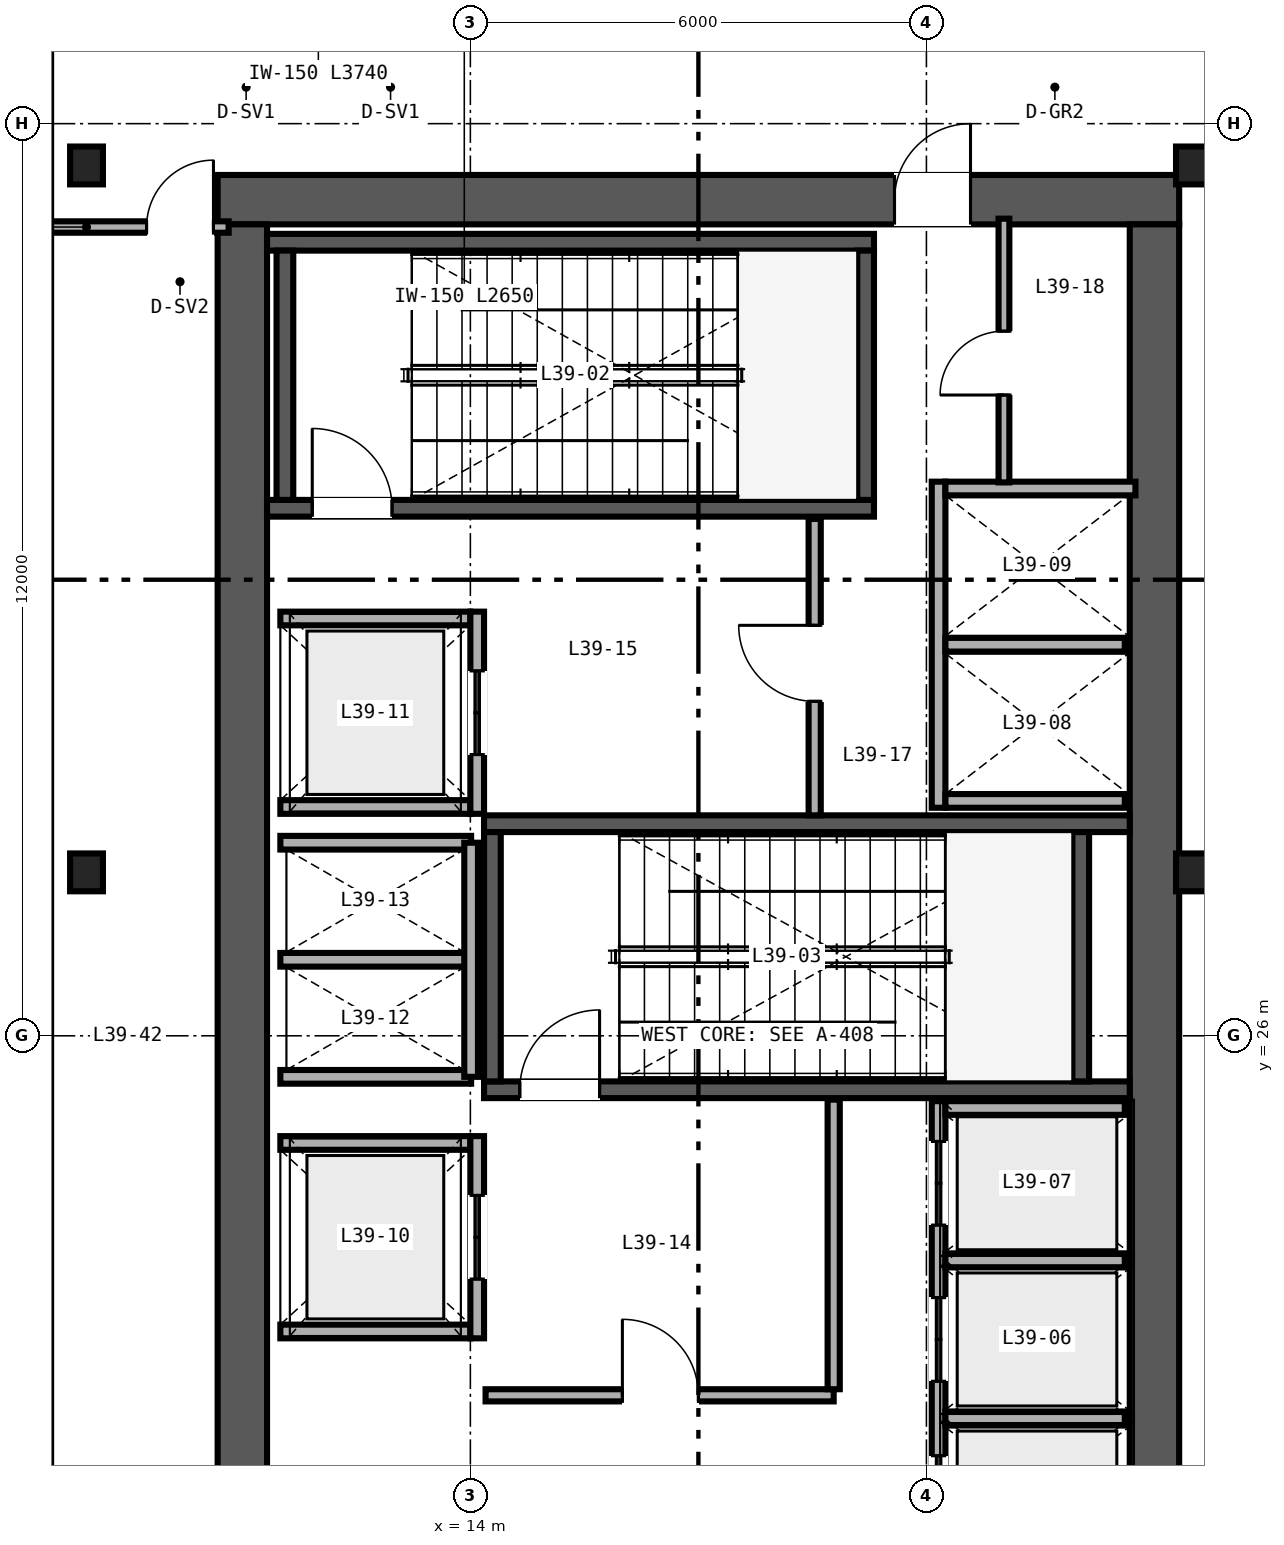
"""IFC4 building model, lengths in metres.
Left out: names, types, materials, properties, quantities, classifications, styles, units other than length and angle.
Written with IfcOpenShell. Run it as: python <this file> out.ifc"""

import sys

from ifc_helpers import new_model, si_unit, direction, frame, frame_2d, origin, origin_2d, place, context, subcontext, project, spatial, rectangle, i_section, extrude, source, transform, mapped, element, fill, save


model = new_model("IFC4")
c1 = context("Model", 3, precision=1e-05, world=origin(), true_north=direction((0.0, 1.0)))
c2 = subcontext(c1, "Body", "Model", "MODEL_VIEW")
j1 = project(units=[si_unit("LENGTHUNIT", "METRE"), si_unit("PLANEANGLEUNIT", "RADIAN")], contexts=[c1])
p1 = place(None, origin())
s1 = spatial("IfcSite", under=j1, at=p1, CompositionType="ELEMENT")
p2 = place(p1, origin())
s2 = spatial("IfcBuilding", under=s1, at=p2, CompositionType="ELEMENT")
p3 = place(p2, frame((0.0, 0.0, 158.4)))
s3 = spatial("IfcBuildingStorey", under=s2, at=p3, CompositionType="ELEMENT", Elevation=158.4)
p4 = place(p3, frame((10.675, 37.0, 0.0), z_axis=(0.0, 0.0, 1.0), x_axis=(1.0, 0.0, 0.0)))
e1 = element("IfcWall", 1, at=p4, inside=s3, PredefinedType="SHEAR", context=c2, shape_type="SweptSolid", body=[
    extrude(rectangle(XDim=12.65, YDim=0.65, at=frame_2d((6.325, 0.0))), origin(), (0.0, 0.0, 1.0), 4.57),
])
p5 = place(p4, frame((8.905, 0.0, 0.0)))
e2 = element("IfcOpeningElement", 2, at=p5, cuts=e1, PredefinedType="OPENING", context=c2, shape_type="SweptSolid", body=[
    extrude(rectangle(XDim=1.0, YDim=2.15, at=frame_2d((0.5, 1.075))), frame((0.0, 0.335, 0.0), z_axis=(0.0, -1.0, 0.0), x_axis=(1.0, 0.0, 0.0)), (0.0, 0.0, 1.0), 0.67),
])
for number, where, z_axis, x_axis in (
    (3, (11.0, 15.325, 0.0), (0.0, 0.0, 1.0), (0.0, 1.0, 0.0)),
    (4, (23.0, 15.325, 0.0), (0.0, 0.0, 1.0), (0.0, 1.0, 0.0)),
):
    element("IfcWall", number, at=place(p3, frame(where, z_axis=z_axis, x_axis=x_axis)), inside=s3, PredefinedType="SHEAR", context=c2, shape_type="SweptSolid", body=[
        extrude(rectangle(XDim=21.35, YDim=0.65, at=frame_2d((10.675, 0.0))), origin(), (0.0, 0.0, 1.0), 4.57),
    ])
p6 = place(p3, frame((11.325, 32.94, 0.0), z_axis=(0.0, 0.0, 1.0), x_axis=(1.0, 0.0, 0.0)))
e5 = element("IfcWall", 5, at=p6, inside=s3, PredefinedType="SHEAR", context=c2, shape_type="SweptSolid", body=[
    extrude(rectangle(XDim=7.985, YDim=0.22, at=frame_2d((3.993, 0.0))), origin(), (0.0, 0.0, 1.0), 4.6),
])
p7 = place(p6, frame((0.595, 0.0, 0.0)))
e6 = element("IfcOpeningElement", 6, at=p7, cuts=e5, PredefinedType="OPENING", context=c2, shape_type="SweptSolid", body=[
    extrude(rectangle(XDim=1.05, YDim=2.15, at=frame_2d((0.525, 1.075))), frame((0.0, 0.12, 0.0), z_axis=(0.0, -1.0, 0.0), x_axis=(1.0, 0.0, 0.0)), (0.0, 0.0, 1.0), 0.24),
])
p8 = place(p3, frame((11.325, 36.44, 0.0), z_axis=(0.0, 0.0, 1.0), x_axis=(1.0, 0.0, 0.0)))
e7 = element("IfcWall", 7, at=p8, inside=s3, PredefinedType="SHEAR", context=c2, shape_type="SweptSolid", body=[
    extrude(rectangle(XDim=7.985, YDim=0.22, at=frame_2d((3.993, 0.0))), origin(), (0.0, 0.0, 1.0), 4.6),
])
for number, where, z_axis, x_axis in (
    (8, (11.56, 33.05, 0.0), (0.0, 0.0, 1.0), (0.0, 1.0, 0.0)),
    (9, (19.2, 33.05, 0.0), (0.0, 0.0, 1.0), (0.0, 1.0, 0.0)),
):
    element("IfcWall", number, at=place(p3, frame(where, z_axis=z_axis, x_axis=x_axis)), inside=s3, PredefinedType="SHEAR", context=c2, shape_type="SweptSolid", body=[
        extrude(rectangle(XDim=3.28, YDim=0.22, at=frame_2d((1.64, 0.0))), origin(), (0.0, 0.0, 1.0), 4.6),
    ])
p9 = place(p3, frame((14.18, 25.29, 0.0), z_axis=(0.0, 0.0, 1.0), x_axis=(1.0, 0.0, 0.0)))
e10 = element("IfcWall", 10, at=p9, inside=s3, PredefinedType="SHEAR", context=c2, shape_type="SweptSolid", body=[
    extrude(rectangle(XDim=8.495, YDim=0.22, at=frame_2d((4.248, 0.0))), origin(), (0.0, 0.0, 1.0), 4.6),
])
p10 = place(p9, frame((0.47, 0.0, 0.0)))
e11 = element("IfcOpeningElement", 11, at=p10, cuts=e10, PredefinedType="OPENING", context=c2, shape_type="SweptSolid", body=[
    extrude(rectangle(XDim=1.05, YDim=2.15, at=frame_2d((0.525, 1.075))), frame((0.0, 0.12, 0.0), z_axis=(0.0, -1.0, 0.0), x_axis=(1.0, 0.0, 0.0)), (0.0, 0.0, 1.0), 0.24),
])
p11 = place(p3, frame((14.18, 28.79, 0.0), z_axis=(0.0, 0.0, 1.0), x_axis=(1.0, 0.0, 0.0)))
e12 = element("IfcWall", 12, at=p11, inside=s3, PredefinedType="SHEAR", context=c2, shape_type="SweptSolid", body=[
    extrude(rectangle(XDim=8.495, YDim=0.22, at=frame_2d((4.248, 0.0))), origin(), (0.0, 0.0, 1.0), 4.6),
])
for number, where, z_axis, x_axis in (
    (13, (14.29, 25.4, 0.0), (0.0, 0.0, 1.0), (0.0, 1.0, 0.0)),
    (14, (22.03, 25.4, 0.0), (0.0, 0.0, 1.0), (0.0, 1.0, 0.0)),
):
    element("IfcWall", number, at=place(p3, frame(where, z_axis=z_axis, x_axis=x_axis)), inside=s3, PredefinedType="SHEAR", context=c2, shape_type="SweptSolid", body=[
        extrude(rectangle(XDim=3.28, YDim=0.22, at=frame_2d((1.64, 0.0))), origin(), (0.0, 0.0, 1.0), 4.6),
    ])
m1 = source(origin(), c2, "Body", "SweptSolid", [
    extrude(i_section(OverallWidth=0.432, OverallDepth=0.498, WebThickness=0.056, FlangeThickness=0.089, FilletRadius=0.025, at=origin_2d()), origin(), (0.0, 0.0, 1.0), 4.57),
])
for number, where, z_axis, x_axis in (
    (15, (8.95, 28.15, 0.0), (0.0, 0.0, 1.0), (1.0, 0.0, 0.0)),
    (16, (23.5, 28.15, 0.0), (0.0, 0.0, 1.0), (1.0, 0.0, 0.0)),
    (17, (8.95, 37.45, 0.0), (0.0, 0.0, 1.0), (1.0, 0.0, 0.0)),
    (18, (23.5, 37.45, 0.0), (0.0, 0.0, 1.0), (1.0, 0.0, 0.0)),
):
    element("IfcColumn", number, at=place(p3, frame(where, z_axis=z_axis, x_axis=x_axis)), inside=s3, PredefinedType="COLUMN", context=c2, shape_type="MappedRepresentation", body=[
        mapped(m1, transform((0.0, 0.0, 0.0), scale=1.0)),
    ])
p12 = place(p3, frame((20.16, 18.82, 0.0), z_axis=(0.0, 0.0, 1.0), x_axis=(0.0, 1.0, 0.0)))
e19 = element("IfcWall", 19, at=p12, inside=s3, PredefinedType="SOLIDWALL", context=c2, shape_type="SweptSolid", body=[
    extrude(rectangle(XDim=6.32, YDim=0.18, at=frame_2d((3.16, 0.0))), origin(), (0.0, 0.0, 1.0), 3.47),
])
p13 = place(p12, frame((0.555, 0.0, 0.0)))
e20 = element("IfcOpeningElement", 20, at=p13, cuts=e19, PredefinedType="OPENING", context=c2, shape_type="SweptSolid", body=[
    extrude(rectangle(XDim=1.1, YDim=2.2, at=frame_2d((0.55, 1.1))), frame((0.0, 0.1, 0.0), z_axis=(0.0, -1.0, 0.0), x_axis=(1.0, 0.0, 0.0)), (0.0, 0.0, 1.0), 0.2),
])
p14 = place(p12, frame((2.635, 0.0, 0.0)))
e21 = element("IfcOpeningElement", 21, at=p14, cuts=e19, PredefinedType="OPENING", context=c2, shape_type="SweptSolid", body=[
    extrude(rectangle(XDim=1.1, YDim=2.2, at=frame_2d((0.55, 1.1))), frame((0.0, 0.1, 0.0), z_axis=(0.0, -1.0, 0.0), x_axis=(1.0, 0.0, 0.0)), (0.0, 0.0, 1.0), 0.2),
])
p15 = place(p12, frame((4.69, 0.0, 0.0)))
e22 = element("IfcOpeningElement", 22, at=p15, cuts=e19, PredefinedType="OPENING", context=c2, shape_type="SweptSolid", body=[
    extrude(rectangle(XDim=1.1, YDim=2.2, at=frame_2d((0.55, 1.1))), frame((0.0, 0.1, 0.0), z_axis=(0.0, -1.0, 0.0), x_axis=(1.0, 0.0, 0.0)), (0.0, 0.0, 1.0), 0.2),
])
p16 = place(p3, frame((20.25, 25.05, 0.0), z_axis=(0.0, 0.0, 1.0), x_axis=(1.0, 0.0, 0.0)))
e23 = element("IfcWall", 23, at=p16, inside=s3, PredefinedType="SOLIDWALL", context=c2, shape_type="SweptSolid", body=[
    extrude(rectangle(XDim=2.36, YDim=0.18, at=frame_2d((1.18, 0.0))), origin(), (0.0, 0.0, 1.0), 4.57),
])
p17 = place(p3, frame((20.25, 20.965, 0.0), z_axis=(0.0, 0.0, 1.0), x_axis=(1.0, 0.0, 0.0)))
e24 = element("IfcWall", 24, at=p17, inside=s3, PredefinedType="SOLIDWALL", context=c2, shape_type="SweptSolid", body=[
    extrude(rectangle(XDim=2.36, YDim=0.18, at=frame_2d((1.18, 0.0))), origin(), (0.0, 0.0, 1.0), 3.47),
])
p18 = place(p3, frame((20.25, 23.045, 0.0), z_axis=(0.0, 0.0, 1.0), x_axis=(1.0, 0.0, 0.0)))
e25 = element("IfcWall", 25, at=p18, inside=s3, PredefinedType="SOLIDWALL", context=c2, shape_type="SweptSolid", body=[
    extrude(rectangle(XDim=2.36, YDim=0.18, at=frame_2d((1.18, 0.0))), origin(), (0.0, 0.0, 1.0), 4.57),
])
p19 = place(p3, frame((20.16, 29.0, 0.0), z_axis=(0.0, 0.0, 1.0), x_axis=(0.0, 1.0, 0.0)))
e26 = element("IfcWall", 26, at=p19, inside=s3, PredefinedType="SOLIDWALL", context=c2, shape_type="SweptSolid", body=[
    extrude(rectangle(XDim=4.29, YDim=0.18, at=frame_2d((2.145, 0.0))), origin(), (0.0, 0.0, 1.0), 4.57),
])
p20 = place(p3, frame((20.25, 29.09, 0.0), z_axis=(0.0, 0.0, 1.0), x_axis=(1.0, 0.0, 0.0)))
e27 = element("IfcWall", 27, at=p20, inside=s3, PredefinedType="SOLIDWALL", context=c2, shape_type="SweptSolid", body=[
    extrude(rectangle(XDim=2.36, YDim=0.18, at=frame_2d((1.18, 0.0))), origin(), (0.0, 0.0, 1.0), 4.57),
])
p21 = place(p3, frame((20.25, 33.2, 0.0), z_axis=(0.0, 0.0, 1.0), x_axis=(1.0, 0.0, 0.0)))
e28 = element("IfcWall", 28, at=p21, inside=s3, PredefinedType="SOLIDWALL", context=c2, shape_type="SweptSolid", body=[
    extrude(rectangle(XDim=2.5, YDim=0.18, at=frame_2d((1.25, 0.0))), origin(), (0.0, 0.0, 1.0), 4.57),
])
p22 = place(p3, frame((20.25, 31.145, 0.0), z_axis=(0.0, 0.0, 1.0), x_axis=(1.0, 0.0, 0.0)))
e29 = element("IfcWall", 29, at=p22, inside=s3, PredefinedType="SOLIDWALL", context=c2, shape_type="SweptSolid", body=[
    extrude(rectangle(XDim=2.36, YDim=0.18, at=frame_2d((1.18, 0.0))), origin(), (0.0, 0.0, 1.0), 4.57),
])
for number, where, z_axis, x_axis in (
    (30, (11.5, 22.11, 0.0), (0.0, 0.0, 1.0), (1.0, 0.0, 0.0)),
    (31, (11.5, 24.59, 0.0), (0.0, 0.0, 1.0), (1.0, 0.0, 0.0)),
):
    element("IfcWall", number, at=place(p3, frame(where, z_axis=z_axis, x_axis=x_axis)), inside=s3, PredefinedType="SOLIDWALL", context=c2, shape_type="SweptSolid", body=[
        extrude(rectangle(XDim=2.5, YDim=0.18, at=frame_2d((1.25, 0.0))), origin(), (0.0, 0.0, 1.0), 4.57),
    ])
p23 = place(p3, frame((14.09, 22.02, 0.0), z_axis=(0.0, 0.0, 1.0), x_axis=(0.0, 1.0, 0.0)))
e32 = element("IfcWall", 32, at=p23, inside=s3, PredefinedType="SOLIDWALL", context=c2, shape_type="SweptSolid", body=[
    extrude(rectangle(XDim=2.66, YDim=0.18, at=frame_2d((1.33, 0.0))), origin(), (0.0, 0.0, 1.0), 4.57),
])
p24 = place(p23, frame((0.78, 0.0, 0.0)))
e33 = element("IfcOpeningElement", 33, at=p24, cuts=e32, PredefinedType="OPENING", context=c2, shape_type="SweptSolid", body=[
    extrude(rectangle(XDim=1.1, YDim=2.2, at=frame_2d((0.55, 1.1))), frame((0.0, 0.1, 0.0), z_axis=(0.0, -1.0, 0.0), x_axis=(1.0, 0.0, 0.0)), (0.0, 0.0, 1.0), 0.2),
])
for number, where, z_axis, x_axis in (
    (34, (11.5, 29.01, 0.0), (0.0, 0.0, 1.0), (1.0, 0.0, 0.0)),
    (35, (11.5, 31.49, 0.0), (0.0, 0.0, 1.0), (1.0, 0.0, 0.0)),
):
    element("IfcWall", number, at=place(p3, frame(where, z_axis=z_axis, x_axis=x_axis)), inside=s3, PredefinedType="SOLIDWALL", context=c2, shape_type="SweptSolid", body=[
        extrude(rectangle(XDim=2.5, YDim=0.18, at=frame_2d((1.25, 0.0))), origin(), (0.0, 0.0, 1.0), 4.57),
    ])
p25 = place(p3, frame((14.09, 28.92, 0.0), z_axis=(0.0, 0.0, 1.0), x_axis=(0.0, 1.0, 0.0)))
e36 = element("IfcWall", 36, at=p25, inside=s3, PredefinedType="SOLIDWALL", context=c2, shape_type="SweptSolid", body=[
    extrude(rectangle(XDim=2.66, YDim=0.18, at=frame_2d((1.33, 0.0))), origin(), (0.0, 0.0, 1.0), 4.57),
])
p26 = place(p25, frame((0.78, 0.0, 0.0)))
e37 = element("IfcOpeningElement", 37, at=p26, cuts=e36, PredefinedType="OPENING", context=c2, shape_type="SweptSolid", body=[
    extrude(rectangle(XDim=1.1, YDim=2.2, at=frame_2d((0.55, 1.1))), frame((0.0, 0.1, 0.0), z_axis=(0.0, -1.0, 0.0), x_axis=(1.0, 0.0, 0.0)), (0.0, 0.0, 1.0), 0.2),
])
for number, where, z_axis, x_axis in (
    (38, (11.5, 25.46, 0.0), (0.0, 0.0, 1.0), (1.0, 0.0, 0.0)),
    (39, (11.5, 27.0, 0.0), (0.0, 0.0, 1.0), (1.0, 0.0, 0.0)),
    (40, (11.5, 28.54, 0.0), (0.0, 0.0, 1.0), (1.0, 0.0, 0.0)),
):
    element("IfcWall", number, at=place(p3, frame(where, z_axis=z_axis, x_axis=x_axis)), inside=s3, PredefinedType="SOLIDWALL", context=c2, shape_type="SweptSolid", body=[
        extrude(rectangle(XDim=2.51, YDim=0.18, at=frame_2d((1.255, 0.0))), origin(), (0.0, 0.0, 1.0), 4.57),
    ])
p27 = place(p3, frame((14.01, 25.46, 0.0), z_axis=(0.0, 0.0, 1.0), x_axis=(0.0, 1.0, 0.0)))
e41 = element("IfcWall", 41, at=p27, inside=s3, PredefinedType="SOLIDWALL", context=c2, shape_type="SweptSolid", body=[
    extrude(rectangle(XDim=3.08, YDim=0.18, at=frame_2d((1.54, 0.0))), origin(), (0.0, 0.0, 1.0), 4.57),
])
p28 = place(p3, frame((14.2, 21.27, 0.0), z_axis=(0.0, 0.0, 1.0), x_axis=(1.0, 0.0, 0.0)))
e42 = element("IfcWall", 42, at=p28, inside=s3, PredefinedType="PARTITIONING", context=c2, shape_type="SweptSolid", body=[
    extrude(rectangle(XDim=4.58, YDim=0.16, at=frame_2d((2.29, 0.0))), origin(), (0.0, 0.0, 1.0), 4.57),
])
p29 = place(p28, frame((1.8, 0.0, 0.0)))
e43 = element("IfcOpeningElement", 43, at=p29, cuts=e42, PredefinedType="OPENING", context=c2, shape_type="SweptSolid", body=[
    extrude(rectangle(XDim=1.0, YDim=2.15, at=frame_2d((0.5, 1.075))), frame((0.0, 0.09, 0.0), z_axis=(0.0, -1.0, 0.0), x_axis=(1.0, 0.0, 0.0)), (0.0, 0.0, 1.0), 0.18),
])
p30 = place(p3, frame((18.78, 21.35, 0.0), z_axis=(0.0, 0.0, 1.0), x_axis=(0.0, 1.0, 0.0)))
e44 = element("IfcWall", 44, at=p30, inside=s3, PredefinedType="PARTITIONING", context=c2, shape_type="SweptSolid", body=[
    extrude(rectangle(XDim=3.81, YDim=0.16, at=frame_2d((1.905, 0.0))), origin(), (0.0, 0.0, 1.0), 4.57),
])
p31 = place(p3, frame((18.53, 28.9, 0.0), z_axis=(0.0, 0.0, 1.0), x_axis=(0.0, 1.0, 0.0)))
e45 = element("IfcWall", 45, at=p31, inside=s3, PredefinedType="PARTITIONING", context=c2, shape_type="SweptSolid", body=[
    extrude(rectangle(XDim=3.9, YDim=0.16, at=frame_2d((1.95, 0.0))), origin(), (0.0, 0.0, 1.0), 4.57),
])
p32 = place(p31, frame((1.5, 0.0, 0.0)))
e46 = element("IfcOpeningElement", 46, at=p32, cuts=e45, PredefinedType="OPENING", context=c2, shape_type="SweptSolid", body=[
    extrude(rectangle(XDim=1.0, YDim=2.15, at=frame_2d((0.5, 1.075))), frame((0.0, 0.09, 0.0), z_axis=(0.0, -1.0, 0.0), x_axis=(1.0, 0.0, 0.0)), (0.0, 0.0, 1.0), 0.18),
])
p33 = place(p3, frame((21.02, 33.28, 0.0), z_axis=(0.0, 0.0, 1.0), x_axis=(0.0, 1.0, 0.0)))
e47 = element("IfcWall", 47, at=p33, inside=s3, PredefinedType="PARTITIONING", context=c2, shape_type="SweptSolid", body=[
    extrude(rectangle(XDim=3.47, YDim=0.142, at=frame_2d((1.735, 0.0))), origin(), (0.0, 0.0, 1.0), 4.57),
])
p34 = place(p33, frame((1.15, 0.0, 0.0)))
e48 = element("IfcOpeningElement", 48, at=p34, cuts=e47, PredefinedType="OPENING", context=c2, shape_type="SweptSolid", body=[
    extrude(rectangle(XDim=0.84, YDim=2.1, at=frame_2d((0.42, 1.05))), frame((0.0, 0.081, 0.0), z_axis=(0.0, -1.0, 0.0), x_axis=(1.0, 0.0, 0.0)), (0.0, 0.0, 1.0), 0.162),
])
p35 = place(p3, frame((8.16, 36.64, 0.0), z_axis=(0.0, 0.0, 1.0), x_axis=(1.0, 0.0, 0.0)))
e49 = element("IfcWall", 49, at=p35, inside=s3, PredefinedType="PARTITIONING", context=c2, shape_type="SweptSolid", body=[
    extrude(rectangle(XDim=2.66, YDim=0.15, at=frame_2d((1.33, 0.0))), origin(), (0.0, 0.0, 1.0), 3.953),
])
p36 = place(p35, frame((1.58, 0.0, 0.0)))
e50 = element("IfcOpeningElement", 50, at=p36, cuts=e49, PredefinedType="OPENING", context=c2, shape_type="SweptSolid", body=[
    extrude(rectangle(XDim=0.88, YDim=2.15, at=frame_2d((0.44, 1.075))), frame((0.0, 0.085, 0.0), z_axis=(0.0, -1.0, 0.0), x_axis=(1.0, 0.0, 0.0)), (0.0, 0.0, 1.0), 0.17),
])
m2 = source(origin(), c2, "Body", "SweptSolid", [
    extrude(rectangle(XDim=1.05, YDim=2.15, at=frame_2d((0.525, 1.075))), frame((0.0, 0.025, 0.0), z_axis=(0.0, -1.0, 0.0), x_axis=(1.0, 0.0, 0.0)), (0.0, 0.0, 1.0), 0.05),
])
p37 = place(p7, origin())
e51 = element("IfcDoor", 51, at=p37, inside=s3, OperationType="SINGLE_SWING_LEFT", PredefinedType="DOOR", context=c2, shape_type="MappedRepresentation", body=[
    mapped(m2, transform((0.0, 0.0, 0.0), scale=1.0)),
])
fill(e6, e51)
p38 = place(p10, origin())
e52 = element("IfcDoor", 52, at=p38, inside=s3, OperationType="SINGLE_SWING_RIGHT", PredefinedType="DOOR", context=c2, shape_type="MappedRepresentation", body=[
    mapped(m2, transform((0.0, 0.0, 0.0), scale=1.0)),
])
fill(e11, e52)
m3 = source(origin(), c2, "Body", "SweptSolid", [
    extrude(rectangle(XDim=1.1, YDim=2.2, at=frame_2d((0.55, 1.1))), frame((0.0, 0.025, 0.0), z_axis=(0.0, -1.0, 0.0), x_axis=(1.0, 0.0, 0.0)), (0.0, 0.0, 1.0), 0.05),
])
p39 = place(p13, origin())
e53 = element("IfcDoor", 53, at=p39, inside=s3, OperationType="DOUBLE_DOOR_SLIDING", PredefinedType="DOOR", context=c2, shape_type="MappedRepresentation", body=[
    mapped(m3, transform((0.0, 0.0, 0.0), scale=1.0)),
])
fill(e20, e53)
p40 = place(p14, origin())
e54 = element("IfcDoor", 54, at=p40, inside=s3, OperationType="DOUBLE_DOOR_SLIDING", PredefinedType="DOOR", context=c2, shape_type="MappedRepresentation", body=[
    mapped(m3, transform((0.0, 0.0, 0.0), scale=1.0)),
])
fill(e21, e54)
p41 = place(p15, origin())
e55 = element("IfcDoor", 55, at=p41, inside=s3, OperationType="DOUBLE_DOOR_SLIDING", PredefinedType="DOOR", context=c2, shape_type="MappedRepresentation", body=[
    mapped(m3, transform((0.0, 0.0, 0.0), scale=1.0)),
])
fill(e22, e55)
p42 = place(p24, origin())
e56 = element("IfcDoor", 56, at=p42, inside=s3, OperationType="DOUBLE_DOOR_SLIDING", PredefinedType="DOOR", context=c2, shape_type="MappedRepresentation", body=[
    mapped(m3, transform((0.0, 0.0, 0.0), scale=1.0)),
])
fill(e33, e56)
p43 = place(p26, origin())
e57 = element("IfcDoor", 57, at=p43, inside=s3, OperationType="DOUBLE_DOOR_SLIDING", PredefinedType="DOOR", context=c2, shape_type="MappedRepresentation", body=[
    mapped(m3, transform((0.0, 0.0, 0.0), scale=1.0)),
])
fill(e37, e57)
m4 = source(origin(), c2, "Body", "SweptSolid", [
    extrude(rectangle(XDim=1.0, YDim=2.15, at=frame_2d((0.5, 1.075))), frame((0.0, 0.025, 0.0), z_axis=(0.0, -1.0, 0.0), x_axis=(1.0, 0.0, 0.0)), (0.0, 0.0, 1.0), 0.05),
])
p44 = place(p29, origin())
e58 = element("IfcDoor", 58, at=p44, inside=s3, OperationType="SINGLE_SWING_LEFT", PredefinedType="DOOR", context=c2, shape_type="MappedRepresentation", body=[
    mapped(m4, transform((0.0, 0.0, 0.0), scale=1.0)),
])
fill(e43, e58)
p45 = place(p32, origin())
e59 = element("IfcDoor", 59, at=p45, inside=s3, OperationType="SINGLE_SWING_RIGHT", PredefinedType="DOOR", context=c2, shape_type="MappedRepresentation", body=[
    mapped(m4, transform((0.0, 0.0, 0.0), scale=1.0)),
])
fill(e46, e59)
m5 = source(origin(), c2, "Body", "SweptSolid", [
    extrude(rectangle(XDim=0.84, YDim=2.1, at=frame_2d((0.42, 1.05))), frame((0.0, 0.025, 0.0), z_axis=(0.0, -1.0, 0.0), x_axis=(1.0, 0.0, 0.0)), (0.0, 0.0, 1.0), 0.05),
])
p46 = place(p34, origin())
e60 = element("IfcDoor", 60, at=p46, inside=s3, OperationType="SINGLE_SWING_LEFT", PredefinedType="DOOR", context=c2, shape_type="MappedRepresentation", body=[
    mapped(m5, transform((0.0, 0.0, 0.0), scale=1.0)),
])
fill(e48, e60)
p47 = place(p5, origin())
e61 = element("IfcDoor", 61, at=p47, inside=s3, OperationType="SINGLE_SWING_RIGHT", PredefinedType="DOOR", context=c2, shape_type="MappedRepresentation", body=[
    mapped(m4, transform((0.0, 0.0, 0.0), scale=1.0)),
])
fill(e2, e61)
m6 = source(origin(), c2, "Body", "SweptSolid", [
    extrude(rectangle(XDim=0.88, YDim=2.15, at=frame_2d((0.44, 1.075))), frame((0.0, 0.025, 0.0), z_axis=(0.0, -1.0, 0.0), x_axis=(1.0, 0.0, 0.0)), (0.0, 0.0, 1.0), 0.05),
])
p48 = place(p36, origin())
e62 = element("IfcDoor", 62, at=p48, inside=s3, OperationType="SINGLE_SWING_RIGHT", PredefinedType="DOOR", context=c2, shape_type="MappedRepresentation", body=[
    mapped(m6, transform((0.0, 0.0, 0.0), scale=1.0)),
])
fill(e50, e62)
save(model, sys.argv[1])
